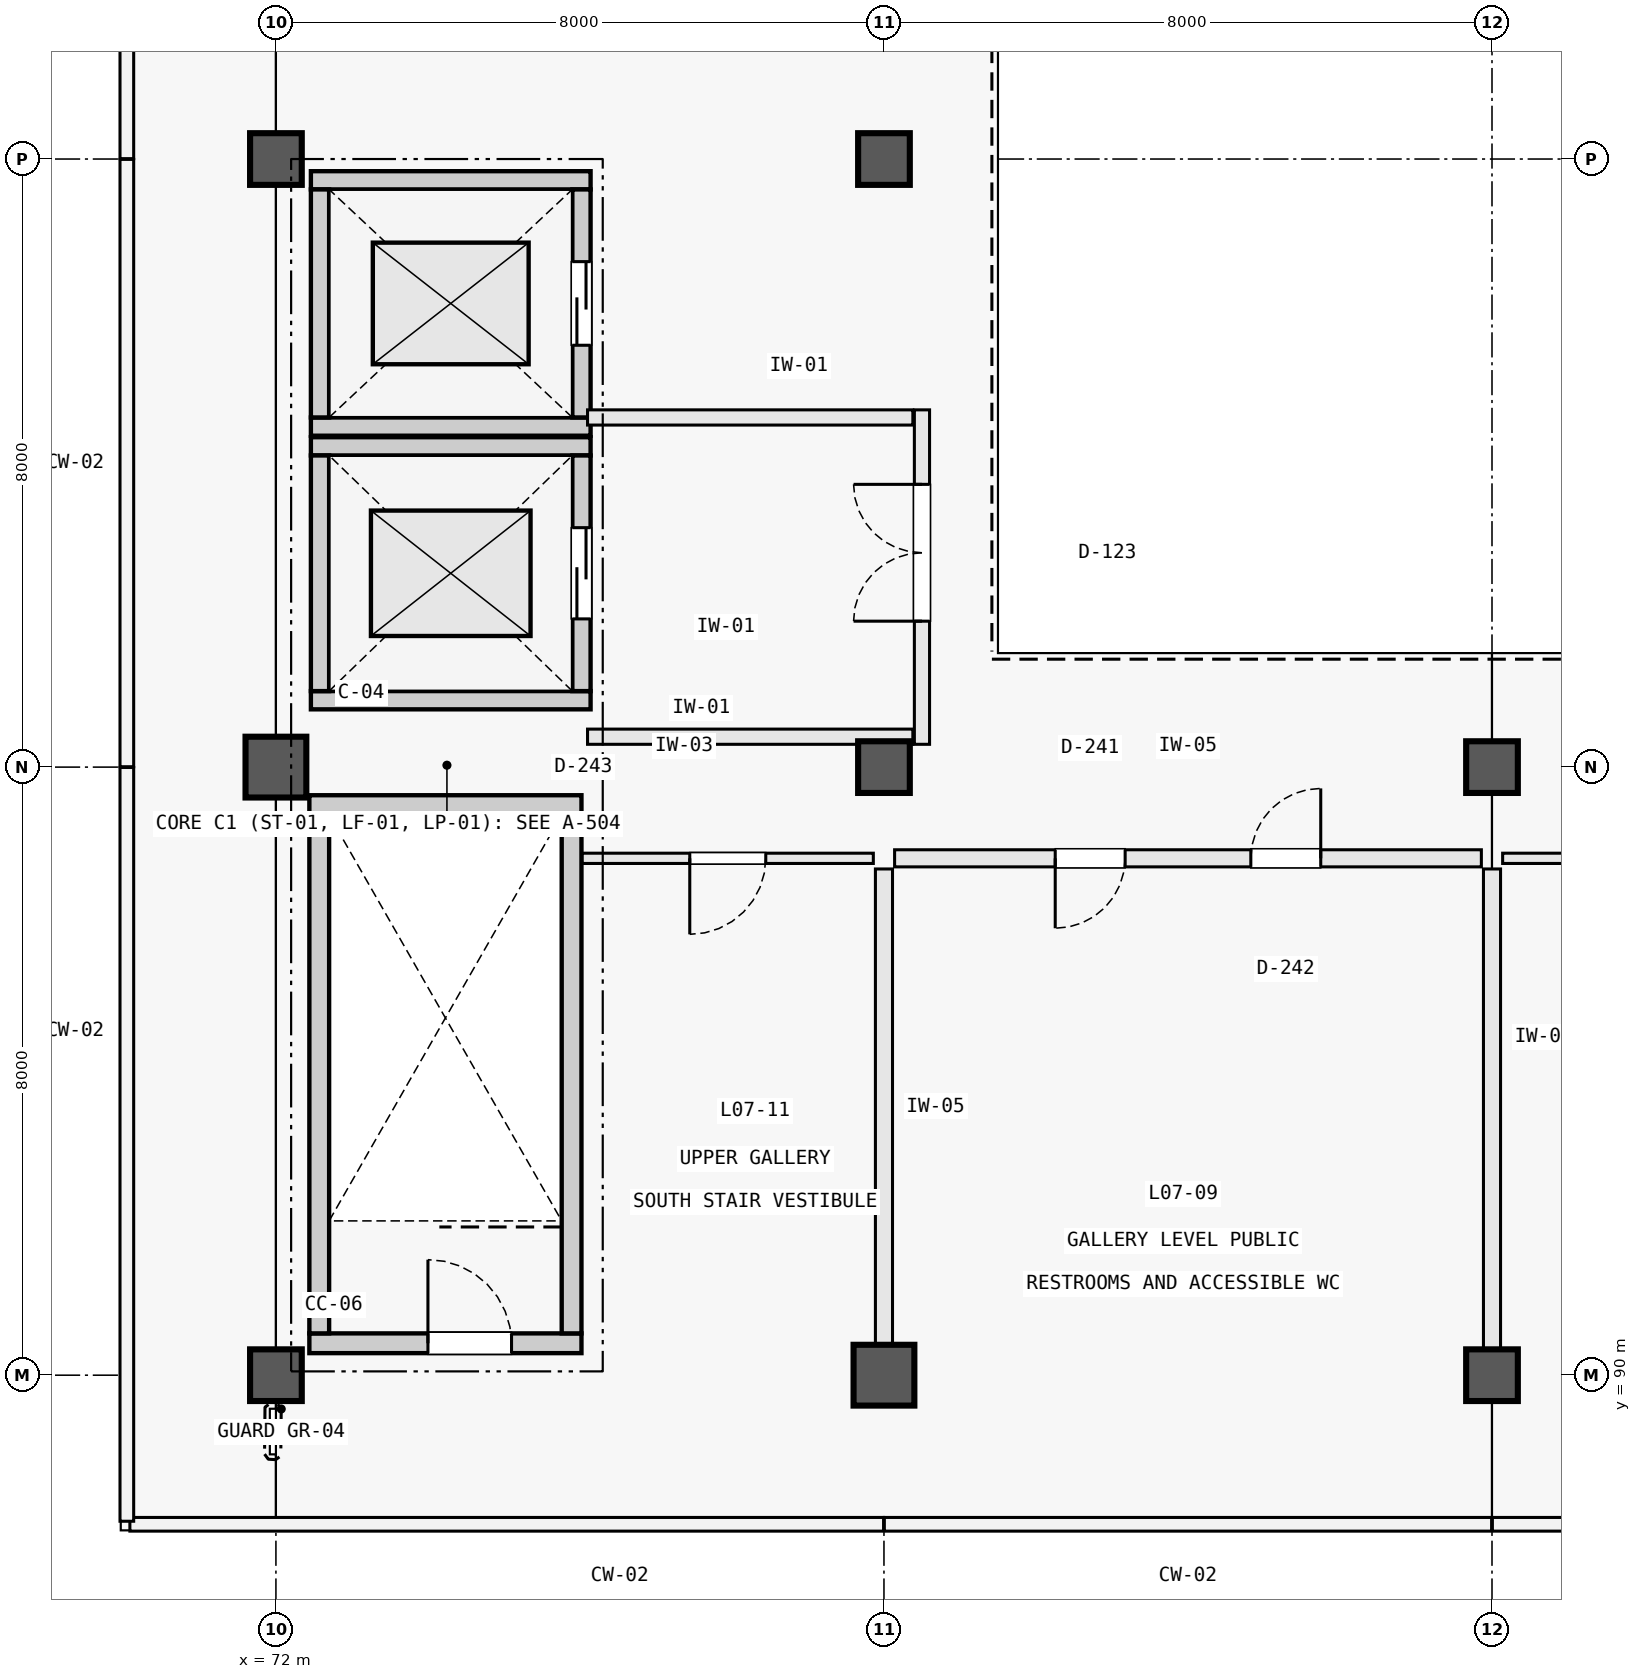
"""IFC4 building model, lengths in metres.
Left out: names, types, materials, properties, quantities, classifications, styles, units other than length and angle.
Written with IfcOpenShell. Run it as: python <this file> out.ifc"""

import sys

from ifc_helpers import new_model, si_unit, direction, frame, frame_2d, origin, origin_2d, place, context, subcontext, project, spatial, rectangle, circle, extrude, element, fill, save


model = new_model("IFC4")
c1 = context("Model", 3, precision=1e-05, world=origin(), true_north=direction((0.0, 1.0)))
c2 = subcontext(c1, "Body", "Model", "MODEL_VIEW")
j1 = project(units=[si_unit("LENGTHUNIT", "METRE"), si_unit("PLANEANGLEUNIT", "RADIAN")], contexts=[c1])
p1 = place(None, origin())
s1 = spatial("IfcSite", under=j1, at=p1, CompositionType="ELEMENT")
p2 = place(p1, origin())
s2 = spatial("IfcBuilding", under=s1, at=p2, CompositionType="ELEMENT")
p3 = place(p2, frame((0.0, 0.0, 30.3)))
s3 = spatial("IfcBuildingStorey", under=s2, at=p3, CompositionType="ELEMENT", Elevation=30.3)
p4 = place(p3, frame((72.0, 90.0, 0.0), z_axis=(0.0, 0.0, 1.0), x_axis=(1.0, 0.0, 0.0)))
e1 = element("IfcColumn", 1, at=p4, inside=s3, PredefinedType="COLUMN", context=c2, shape_type="SweptSolid", body=[
    extrude(circle(Radius=0.34, at=origin_2d()), origin(), (0.0, 0.0, 1.0), 4.5),
])
p5 = place(p3, frame((72.0, 98.0, 0.0), z_axis=(0.0, 0.0, 1.0), x_axis=(1.0, 0.0, 0.0)))
e2 = element("IfcColumn", 2, at=p5, inside=s3, PredefinedType="COLUMN", context=c2, shape_type="SweptSolid", body=[
    extrude(rectangle(XDim=0.8, YDim=0.8, at=origin_2d()), origin(), (0.0, 0.0, 1.0), 4.5),
])
p6 = place(p3, frame((72.0, 106.0, 0.0), z_axis=(0.0, 0.0, 1.0), x_axis=(1.0, 0.0, 0.0)))
e3 = element("IfcColumn", 3, at=p6, inside=s3, PredefinedType="COLUMN", context=c2, shape_type="SweptSolid", body=[
    extrude(circle(Radius=0.34, at=origin_2d()), origin(), (0.0, 0.0, 1.0), 4.5),
])
p7 = place(p3, frame((80.0, 90.0, 0.0), z_axis=(0.0, 0.0, 1.0), x_axis=(1.0, 0.0, 0.0)))
e4 = element("IfcColumn", 4, at=p7, inside=s3, PredefinedType="COLUMN", context=c2, shape_type="SweptSolid", body=[
    extrude(rectangle(XDim=0.8, YDim=0.8, at=origin_2d()), origin(), (0.0, 0.0, 1.0), 4.5),
])
for number, where, z_axis, x_axis in (
    (5, (80.0, 98.0, 0.0), (0.0, 0.0, 1.0), (1.0, 0.0, 0.0)),
    (6, (80.0, 106.0, 0.0), (0.0, 0.0, 1.0), (1.0, 0.0, 0.0)),
    (7, (88.0, 90.0, 0.0), (0.0, 0.0, 1.0), (1.0, 0.0, 0.0)),
    (8, (88.0, 98.0, 0.0), (0.0, 0.0, 1.0), (1.0, 0.0, 0.0)),
):
    element("IfcColumn", number, at=place(p3, frame(where, z_axis=z_axis, x_axis=x_axis)), inside=s3, PredefinedType="COLUMN", context=c2, shape_type="SweptSolid", body=[
        extrude(circle(Radius=0.34, at=origin_2d()), origin(), (0.0, 0.0, 1.0), 4.5),
    ])
p8 = place(p3, frame((72.44, 90.42, 0.0), z_axis=(0.0, 0.0, 1.0), x_axis=(1.0, 0.0, 0.0)))
e9 = element("IfcWall", 9, at=p8, inside=s3, PredefinedType="SOLIDWALL", context=c2, shape_type="SweptSolid", body=[
    extrude(rectangle(XDim=3.58, YDim=0.26, at=frame_2d((1.79, 0.0))), origin(), (0.0, 0.0, 1.0), 4.5),
])
p9 = place(p8, frame((1.56, 0.0, 0.0)))
e10 = element("IfcOpeningElement", 10, at=p9, cuts=e9, PredefinedType="OPENING", context=c2, shape_type="SweptSolid", body=[
    extrude(rectangle(XDim=1.1, YDim=2.2, at=frame_2d((0.55, 1.1))), frame((0.0, 0.142, 0.0), z_axis=(0.0, -1.0, 0.0), x_axis=(1.0, 0.0, 0.0)), (0.0, 0.0, 1.0), 0.284),
])
p10 = place(p3, frame((72.44, 97.5, 0.0), z_axis=(0.0, 0.0, 1.0), x_axis=(1.0, 0.0, 0.0)))
e11 = element("IfcWall", 11, at=p10, inside=s3, PredefinedType="SOLIDWALL", context=c2, shape_type="SweptSolid", body=[
    extrude(rectangle(XDim=3.58, YDim=0.26, at=frame_2d((1.79, 0.0))), origin(), (0.0, 0.0, 1.0), 4.5),
])
for number, where, z_axis, x_axis in (
    (12, (72.57, 90.55, 0.0), (0.0, 0.0, 1.0), (0.0, 1.0, 0.0)),
    (13, (75.89, 90.55, 0.0), (0.0, 0.0, 1.0), (0.0, 1.0, 0.0)),
):
    element("IfcWall", number, at=place(p3, frame(where, z_axis=z_axis, x_axis=x_axis)), inside=s3, PredefinedType="SOLIDWALL", context=c2, shape_type="SweptSolid", body=[
        extrude(rectangle(XDim=6.82, YDim=0.26, at=frame_2d((3.41, 0.0))), origin(), (0.0, 0.0, 1.0), 4.5),
    ])
for number, where, z_axis, x_axis in (
    (14, (72.46, 98.88, 0.0), (0.0, 0.0, 1.0), (1.0, 0.0, 0.0)),
    (15, (72.46, 102.22, 0.0), (0.0, 0.0, 1.0), (1.0, 0.0, 0.0)),
):
    element("IfcWall", number, at=place(p3, frame(where, z_axis=z_axis, x_axis=x_axis)), inside=s3, PredefinedType="SOLIDWALL", context=c2, shape_type="SweptSolid", body=[
        extrude(rectangle(XDim=3.68, YDim=0.24, at=frame_2d((1.84, 0.0))), origin(), (0.0, 0.0, 1.0), 4.5),
    ])
p11 = place(p3, frame((72.58, 99.0, 0.0), z_axis=(0.0, 0.0, 1.0), x_axis=(0.0, 1.0, 0.0)))
e16 = element("IfcWall", 16, at=p11, inside=s3, PredefinedType="SOLIDWALL", context=c2, shape_type="SweptSolid", body=[
    extrude(rectangle(XDim=3.1, YDim=0.24, at=frame_2d((1.55, 0.0))), origin(), (0.0, 0.0, 1.0), 4.5),
])
p12 = place(p3, frame((76.02, 99.0, 0.0), z_axis=(0.0, 0.0, 1.0), x_axis=(0.0, 1.0, 0.0)))
e17 = element("IfcWall", 17, at=p12, inside=s3, PredefinedType="SOLIDWALL", context=c2, shape_type="SweptSolid", body=[
    extrude(rectangle(XDim=3.1, YDim=0.24, at=frame_2d((1.55, 0.0))), origin(), (0.0, 0.0, 1.0), 4.5),
])
p13 = place(p12, frame((0.95, 0.0, 0.0)))
e18 = element("IfcOpeningElement", 18, at=p13, cuts=e17, PredefinedType="OPENING", context=c2, shape_type="SweptSolid", body=[
    extrude(rectangle(XDim=1.2, YDim=2.2, at=frame_2d((0.6, 1.1))), frame((0.0, 0.132, 0.0), z_axis=(0.0, -1.0, 0.0), x_axis=(1.0, 0.0, 0.0)), (0.0, 0.0, 1.0), 0.264),
])
for number, where, z_axis, x_axis in (
    (19, (72.46, 102.48, 0.0), (0.0, 0.0, 1.0), (1.0, 0.0, 0.0)),
    (20, (72.46, 105.72, 0.0), (0.0, 0.0, 1.0), (1.0, 0.0, 0.0)),
):
    element("IfcWall", number, at=place(p3, frame(where, z_axis=z_axis, x_axis=x_axis)), inside=s3, PredefinedType="SOLIDWALL", context=c2, shape_type="SweptSolid", body=[
        extrude(rectangle(XDim=3.68, YDim=0.24, at=frame_2d((1.84, 0.0))), origin(), (0.0, 0.0, 1.0), 4.5),
    ])
p14 = place(p3, frame((72.58, 102.6, 0.0), z_axis=(0.0, 0.0, 1.0), x_axis=(0.0, 1.0, 0.0)))
e21 = element("IfcWall", 21, at=p14, inside=s3, PredefinedType="SOLIDWALL", context=c2, shape_type="SweptSolid", body=[
    extrude(rectangle(XDim=3.0, YDim=0.24, at=frame_2d((1.5, 0.0))), origin(), (0.0, 0.0, 1.0), 4.5),
])
p15 = place(p3, frame((76.02, 102.6, 0.0), z_axis=(0.0, 0.0, 1.0), x_axis=(0.0, 1.0, 0.0)))
e22 = element("IfcWall", 22, at=p15, inside=s3, PredefinedType="SOLIDWALL", context=c2, shape_type="SweptSolid", body=[
    extrude(rectangle(XDim=3.0, YDim=0.24, at=frame_2d((1.5, 0.0))), origin(), (0.0, 0.0, 1.0), 4.5),
])
p16 = place(p15, frame((0.95, 0.0, 0.0)))
e23 = element("IfcOpeningElement", 23, at=p16, cuts=e22, PredefinedType="OPENING", context=c2, shape_type="SweptSolid", body=[
    extrude(rectangle(XDim=1.1, YDim=2.2, at=frame_2d((0.55, 1.1))), frame((0.0, 0.132, 0.0), z_axis=(0.0, -1.0, 0.0), x_axis=(1.0, 0.0, 0.0)), (0.0, 0.0, 1.0), 0.264),
])
for number, where, z_axis, x_axis in (
    (24, (76.1, 98.4, 0.0), (0.0, 0.0, 1.0), (1.0, 0.0, 0.0)),
    (25, (76.1, 102.6, 0.0), (0.0, 0.0, 1.0), (1.0, 0.0, 0.0)),
):
    element("IfcWall", number, at=place(p3, frame(where, z_axis=z_axis, x_axis=x_axis)), inside=s3, PredefinedType="PARTITIONING", context=c2, shape_type="SweptSolid", body=[
        extrude(rectangle(XDim=4.28, YDim=0.2, at=frame_2d((2.14, 0.0))), origin(), (0.0, 0.0, 1.0), 3.28),
    ])
p17 = place(p3, frame((80.5, 98.3, 0.0), z_axis=(0.0, 0.0, 1.0), x_axis=(0.0, 1.0, 0.0)))
e26 = element("IfcWall", 26, at=p17, inside=s3, PredefinedType="PARTITIONING", context=c2, shape_type="SweptSolid", body=[
    extrude(rectangle(XDim=4.4, YDim=0.2, at=frame_2d((2.2, 0.0))), origin(), (0.0, 0.0, 1.0), 3.28),
])
p18 = place(p17, frame((1.62, 0.0, 0.0)))
e27 = element("IfcOpeningElement", 27, at=p18, cuts=e26, PredefinedType="OPENING", context=c2, shape_type="SweptSolid", body=[
    extrude(rectangle(XDim=1.8, YDim=2.25, at=frame_2d((0.9, 1.125))), frame((0.0, 0.112, 0.0), z_axis=(0.0, -1.0, 0.0), x_axis=(1.0, 0.0, 0.0)), (0.0, 0.0, 1.0), 0.224),
])
p19 = place(p3, frame((80.0, 90.41, 0.0), z_axis=(0.0, 0.0, 1.0), x_axis=(0.0, 1.0, 0.0)))
e28 = element("IfcWall", 28, at=p19, inside=s3, PredefinedType="PARTITIONING", context=c2, shape_type="SweptSolid", body=[
    extrude(rectangle(XDim=6.25, YDim=0.225, at=frame_2d((3.125, 0.0))), origin(), (0.0, 0.0, 1.0), 3.11),
])
p20 = place(p3, frame((88.0, 90.35, 0.0), z_axis=(0.0, 0.0, 1.0), x_axis=(0.0, 1.0, 0.0)))
e29 = element("IfcWall", 29, at=p20, inside=s3, PredefinedType="PARTITIONING", context=c2, shape_type="SweptSolid", body=[
    extrude(rectangle(XDim=6.31, YDim=0.225, at=frame_2d((3.155, 0.0))), origin(), (0.0, 0.0, 1.0), 3.11),
])
p21 = place(p3, frame((80.14, 96.8, 0.0), z_axis=(0.0, 0.0, 1.0), x_axis=(1.0, 0.0, 0.0)))
e30 = element("IfcWall", 30, at=p21, inside=s3, PredefinedType="PARTITIONING", context=c2, shape_type="SweptSolid", body=[
    extrude(rectangle(XDim=7.72, YDim=0.225, at=frame_2d((3.86, 0.0))), origin(), (0.0, 0.0, 1.0), 3.11),
])
p22 = place(p21, frame((2.113, 0.0, 0.0)))
e31 = element("IfcOpeningElement", 31, at=p22, cuts=e30, PredefinedType="OPENING", context=c2, shape_type="SweptSolid", body=[
    extrude(rectangle(XDim=0.92, YDim=2.1, at=frame_2d((0.46, 1.05))), frame((0.0, 0.125, 0.0), z_axis=(0.0, -1.0, 0.0), x_axis=(1.0, 0.0, 0.0)), (0.0, 0.0, 1.0), 0.249),
])
p23 = place(p21, frame((4.687, 0.0, 0.0)))
e32 = element("IfcOpeningElement", 32, at=p23, cuts=e30, PredefinedType="OPENING", context=c2, shape_type="SweptSolid", body=[
    extrude(rectangle(XDim=0.92, YDim=2.1, at=frame_2d((0.46, 1.05))), frame((0.0, 0.125, 0.0), z_axis=(0.0, -1.0, 0.0), x_axis=(1.0, 0.0, 0.0)), (0.0, 0.0, 1.0), 0.249),
])
p24 = place(p3, frame((76.03, 96.8, 0.0), z_axis=(0.0, 0.0, 1.0), x_axis=(1.0, 0.0, 0.0)))
e33 = element("IfcWall", 33, at=p24, inside=s3, PredefinedType="PARTITIONING", context=c2, shape_type="SweptSolid", body=[
    extrude(rectangle(XDim=3.83, YDim=0.135, at=frame_2d((1.915, 0.0))), origin(), (0.0, 0.0, 1.0), 3.11),
])
p25 = place(p24, frame((1.415, 0.0, 0.0)))
e34 = element("IfcOpeningElement", 34, at=p25, cuts=e33, PredefinedType="OPENING", context=c2, shape_type="SweptSolid", body=[
    extrude(rectangle(XDim=1.0, YDim=2.15, at=frame_2d((0.5, 1.075))), frame((0.0, 0.08, 0.0), z_axis=(0.0, -1.0, 0.0), x_axis=(1.0, 0.0, 0.0)), (0.0, 0.0, 1.0), 0.159),
])
p26 = place(p3, frame((88.14, 96.8, 0.0), z_axis=(0.0, 0.0, 1.0), x_axis=(1.0, 0.0, 0.0)))
e35 = element("IfcWall", 35, at=p26, inside=s3, PredefinedType="PARTITIONING", context=c2, shape_type="SweptSolid", body=[
    extrude(rectangle(XDim=7.86, YDim=0.135, at=frame_2d((3.93, 0.0))), origin(), (0.0, 0.0, 1.0), 3.11),
])
p27 = place(p26, frame((3.13, 0.0, 0.0)))
e36 = element("IfcOpeningElement", 36, at=p27, cuts=e35, PredefinedType="OPENING", context=c2, shape_type="SweptSolid", body=[
    extrude(rectangle(XDim=1.6, YDim=2.2, at=frame_2d((0.8, 1.1))), frame((0.0, 0.08, 0.0), z_axis=(0.0, -1.0, 0.0), x_axis=(1.0, 0.0, 0.0)), (0.0, 0.0, 1.0), 0.159),
])
p28 = place(p9, origin())
e37 = element("IfcDoor", 37, at=p28, inside=s3, OperationType="SINGLE_SWING_LEFT", PredefinedType="DOOR", context=c2, shape_type="SweptSolid", body=[
    extrude(rectangle(XDim=1.1, YDim=2.2, at=frame_2d((0.55, 1.1))), frame((0.0, 0.025, 0.0), z_axis=(0.0, -1.0, 0.0), x_axis=(1.0, 0.0, 0.0)), (0.0, 0.0, 1.0), 0.05),
])
fill(e10, e37)
p29 = place(p13, origin())
e38 = element("IfcDoor", 38, at=p29, inside=s3, OperationType="DOUBLE_DOOR_SLIDING", PredefinedType="DOOR", context=c2, shape_type="SweptSolid", body=[
    extrude(rectangle(XDim=1.2, YDim=2.2, at=frame_2d((0.6, 1.1))), frame((0.0, 0.025, 0.0), z_axis=(0.0, -1.0, 0.0), x_axis=(1.0, 0.0, 0.0)), (0.0, 0.0, 1.0), 0.05),
])
fill(e18, e38)
p30 = place(p16, origin())
e39 = element("IfcDoor", 39, at=p30, inside=s3, OperationType="DOUBLE_DOOR_SLIDING", PredefinedType="DOOR", context=c2, shape_type="SweptSolid", body=[
    extrude(rectangle(XDim=1.1, YDim=2.2, at=frame_2d((0.55, 1.1))), frame((0.0, 0.025, 0.0), z_axis=(0.0, -1.0, 0.0), x_axis=(1.0, 0.0, 0.0)), (0.0, 0.0, 1.0), 0.05),
])
fill(e23, e39)
p31 = place(p18, origin())
e40 = element("IfcDoor", 40, at=p31, inside=s3, OperationType="DOUBLE_DOOR_SINGLE_SWING", PredefinedType="DOOR", context=c2, shape_type="SweptSolid", body=[
    extrude(rectangle(XDim=1.8, YDim=2.25, at=frame_2d((0.9, 1.125))), frame((0.0, 0.025, 0.0), z_axis=(0.0, -1.0, 0.0), x_axis=(1.0, 0.0, 0.0)), (0.0, 0.0, 1.0), 0.05),
])
fill(e27, e40)
p32 = place(p22, frame((0.92, 0.0, 0.0), z_axis=(0.0, 0.0, 1.0), x_axis=(-1.0, 0.0, 0.0)))
e41 = element("IfcDoor", 41, at=p32, inside=s3, OperationType="SINGLE_SWING_LEFT", PredefinedType="DOOR", context=c2, shape_type="SweptSolid", body=[
    extrude(rectangle(XDim=0.92, YDim=2.1, at=frame_2d((0.46, 1.05))), frame((0.0, 0.025, 0.0), z_axis=(0.0, -1.0, 0.0), x_axis=(1.0, 0.0, 0.0)), (0.0, 0.0, 1.0), 0.05),
])
fill(e31, e41)
p33 = place(p23, origin())
e42 = element("IfcDoor", 42, at=p33, inside=s3, OperationType="SINGLE_SWING_RIGHT", PredefinedType="DOOR", context=c2, shape_type="SweptSolid", body=[
    extrude(rectangle(XDim=0.92, YDim=2.1, at=frame_2d((0.46, 1.05))), frame((0.0, 0.025, 0.0), z_axis=(0.0, -1.0, 0.0), x_axis=(1.0, 0.0, 0.0)), (0.0, 0.0, 1.0), 0.05),
])
fill(e32, e42)
p34 = place(p25, frame((1.0, 0.0, 0.0), z_axis=(0.0, 0.0, 1.0), x_axis=(-1.0, 0.0, 0.0)))
e43 = element("IfcDoor", 43, at=p34, inside=s3, OperationType="SINGLE_SWING_LEFT", PredefinedType="DOOR", context=c2, shape_type="SweptSolid", body=[
    extrude(rectangle(XDim=1.0, YDim=2.15, at=frame_2d((0.5, 1.075))), frame((0.0, 0.025, 0.0), z_axis=(0.0, -1.0, 0.0), x_axis=(1.0, 0.0, 0.0)), (0.0, 0.0, 1.0), 0.05),
])
fill(e34, e43)
save(model, sys.argv[1])
